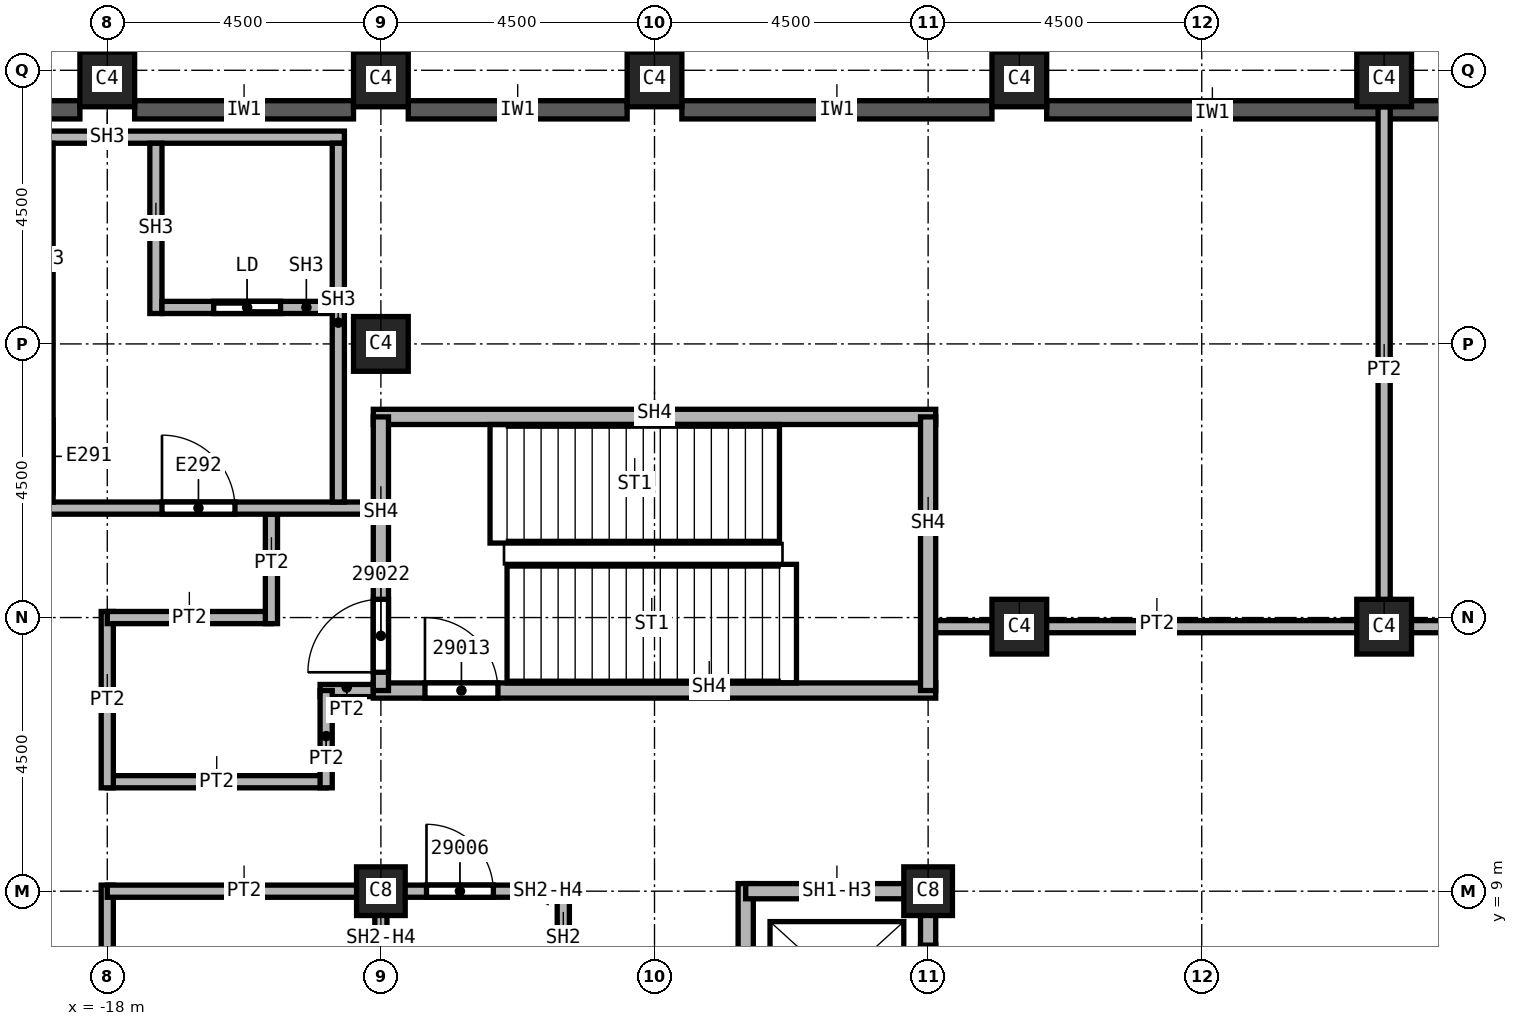
"""IFC4 building model, lengths in metres.
Left out: names, types, materials, properties, quantities, classifications, styles, units other than length and angle.
Written with IfcOpenShell. Run it as: python <this file> out.ifc"""

import sys

from ifc_helpers import new_model, si_unit, direction, frame, frame_2d, origin, origin_2d, place, context, subcontext, project, spatial, rectangle, extrude, element, fill, save


model = new_model("IFC4")
c1 = context("Model", 3, precision=1e-05, world=origin(), true_north=direction((0.0, 1.0)))
c2 = subcontext(c1, "Body", "Model", "MODEL_VIEW")
j1 = project(units=[si_unit("LENGTHUNIT", "METRE"), si_unit("PLANEANGLEUNIT", "RADIAN")], contexts=[c1])
p1 = place(None, origin())
s1 = spatial("IfcSite", under=j1, at=p1, CompositionType="ELEMENT")
p2 = place(p1, origin())
s2 = spatial("IfcBuilding", under=s1, at=p2, CompositionType="ELEMENT")
p3 = place(p2, frame((0.0, 0.0, 294.0)))
s3 = spatial("IfcBuildingStorey", under=s2, at=p3, CompositionType="ELEMENT", Elevation=294.0)
p4 = place(p3, frame((-13.5, 18.0, 0.0), z_axis=(0.0, 0.0, 1.0), x_axis=(1.0, 0.0, 0.0)))
e1 = element("IfcColumn", 1, at=p4, inside=s3, PredefinedType="COLUMN", context=c2, shape_type="SweptSolid", body=[
    extrude(rectangle(XDim=0.9, YDim=0.9, at=origin_2d()), origin(), (0.0, 0.0, 1.0), 5.74),
])
for number, where, z_axis, x_axis in (
    (2, (-4.5, 9.0, 0.0), (0.0, 0.0, 1.0), (1.0, 0.0, 0.0)),
    (3, (-13.5, 9.0, 0.0), (0.0, 0.0, 1.0), (1.0, 0.0, 0.0)),
):
    element("IfcColumn", number, at=place(p3, frame(where, z_axis=z_axis, x_axis=x_axis)), inside=s3, PredefinedType="COLUMN", context=c2, shape_type="SweptSolid", body=[
        extrude(rectangle(XDim=0.8, YDim=0.8, at=origin_2d()), origin(), (0.0, 0.0, 1.0), 5.74),
    ])
for number, where, z_axis, x_axis in (
    (4, (3.0, 22.35, 0.0), (0.0, 0.18, 0.984), (-1.0, 0.0, 0.0)),
    (5, (-3.0, 22.35, 0.0), (0.0, 0.18, 0.984), (-1.0, 0.0, 0.0)),
    (6, (-9.0, 22.35, 0.0), (0.0, 0.18, 0.984), (-1.0, 0.0, 0.0)),
    (7, (-13.5, 22.35, 0.0), (0.0, 0.18, 0.984), (-1.0, 0.0, 0.0)),
    (8, (-18.0, 22.35, 0.0), (0.0, 0.18, 0.984), (-1.0, 0.0, 0.0)),
    (9, (3.0, 13.35, 0.0), (0.0, 0.18, 0.984), (-1.0, 0.0, 0.0)),
    (10, (-3.0, 13.35, 0.0), (0.0, 0.18, 0.984), (-1.0, 0.0, 0.0)),
):
    element("IfcColumn", number, at=place(p3, frame(where, z_axis=z_axis, x_axis=x_axis)), inside=s3, PredefinedType="COLUMN", context=c2, shape_type="SweptSolid", body=[
        extrude(rectangle(XDim=0.9, YDim=0.9, at=origin_2d()), origin(), (0.0, 0.0, 1.0), 5.835),
    ])
for number, where, z_axis, x_axis in (
    (11, (8.55, 21.85, 0.0), (0.0, 0.0, 1.0), (-1.0, 0.0, 0.0)),
    (12, (2.95, 21.85, 0.0), (0.0, 0.0, 1.0), (-1.0, 0.0, 0.0)),
):
    element("IfcWall", number, at=place(p3, frame(where, z_axis=z_axis, x_axis=x_axis)), inside=s3, PredefinedType="SOLIDWALL", context=c2, shape_type="SweptSolid", body=[
        extrude(rectangle(XDim=5.5, YDim=0.3, at=frame_2d((2.75, 0.0))), origin(), (0.0, 0.0, 1.0), 5.14),
    ])
p5 = place(p3, frame((-3.45, 21.85, 0.0), z_axis=(0.0, 0.0, 1.0), x_axis=(-1.0, 0.0, 0.0)))
e13 = element("IfcWall", 13, at=p5, inside=s3, PredefinedType="SOLIDWALL", context=c2, shape_type="SweptSolid", body=[
    extrude(rectangle(XDim=5.1, YDim=0.3, at=frame_2d((2.55, 0.0))), origin(), (0.0, 0.0, 1.0), 5.14),
])
for number, where, z_axis, x_axis in (
    (14, (-9.45, 21.85, 0.0), (0.0, 0.0, 1.0), (-1.0, 0.0, 0.0)),
    (15, (-13.95, 21.85, 0.0), (0.0, 0.0, 1.0), (-1.0, 0.0, 0.0)),
):
    element("IfcWall", number, at=place(p3, frame(where, z_axis=z_axis, x_axis=x_axis)), inside=s3, PredefinedType="SOLIDWALL", context=c2, shape_type="SweptSolid", body=[
        extrude(rectangle(XDim=3.6, YDim=0.3, at=frame_2d((1.8, 0.0))), origin(), (0.0, 0.0, 1.0), 5.14),
    ])
p6 = place(p3, frame((-18.45, 21.85, 0.0), z_axis=(0.0, 0.0, 1.0), x_axis=(-1.0, 0.0, 0.0)))
e16 = element("IfcWall", 16, at=p6, inside=s3, PredefinedType="SOLIDWALL", context=c2, shape_type="SweptSolid", body=[
    extrude(rectangle(XDim=3.8, YDim=0.3, at=frame_2d((1.9, 0.0))), origin(), (0.0, 0.0, 1.0), 5.14),
])
p7 = place(p3, frame((-18.0, 9.1, 0.0), z_axis=(0.0, 0.0, 1.0), x_axis=(0.0, -1.0, 0.0)))
e17 = element("IfcWall", 17, at=p7, inside=s3, PredefinedType="PARTITIONING", context=c2, shape_type="SweptSolid", body=[
    extrude(rectangle(XDim=18.2, YDim=0.2, at=frame_2d((9.1, 0.0))), origin(), (0.0, 0.0, 1.0), 5.74),
])
p8 = place(p7, frame((16.3, 0.0, 0.0)))
e18 = element("IfcOpeningElement", 18, at=p8, cuts=e17, PredefinedType="OPENING", context=c2, shape_type="SweptSolid", body=[
    extrude(rectangle(XDim=1.0, YDim=2.1, at=frame_2d((0.5, 1.05))), frame((0.0, 0.1, 0.0), z_axis=(0.0, -1.0, 0.0), x_axis=(1.0, 0.0, 0.0)), (0.0, 0.0, 1.0), 0.2),
])
p9 = place(p7, frame((6.4, 0.0, 0.0)))
e19 = element("IfcOpeningElement", 19, at=p9, cuts=e17, PredefinedType="OPENING", context=c2, shape_type="SweptSolid", body=[
    extrude(rectangle(XDim=1.0, YDim=2.1, at=frame_2d((0.5, 1.05))), frame((0.0, 0.1, 0.0), z_axis=(0.0, -1.0, 0.0), x_axis=(1.0, 0.0, 0.0)), (0.0, 0.0, 1.0), 0.2),
])
p10 = place(p3, frame((-18.0, 10.8, 0.0), z_axis=(0.0, 0.0, 1.0), x_axis=(1.0, 0.0, 0.0)))
e20 = element("IfcWall", 20, at=p10, inside=s3, PredefinedType="PARTITIONING", context=c2, shape_type="SweptSolid", body=[
    extrude(rectangle(XDim=3.6, YDim=0.2, at=frame_2d((1.8, 0.0))), origin(), (0.0, 0.0, 1.0), 5.74),
])
p11 = place(p3, frame((-18.0, 13.6, 0.0), z_axis=(0.0, 0.0, 1.0), x_axis=(0.0, -1.0, 0.0)))
e21 = element("IfcWall", 21, at=p11, inside=s3, PredefinedType="PARTITIONING", context=c2, shape_type="SweptSolid", body=[
    extrude(rectangle(XDim=2.9, YDim=0.2, at=frame_2d((1.45, 0.0))), origin(), (0.0, 0.0, 1.0), 5.74),
])
p12 = place(p3, frame((-15.3, 13.5, 0.0), z_axis=(0.0, 0.0, 1.0), x_axis=(-1.0, 0.0, 0.0)))
e22 = element("IfcWall", 22, at=p12, inside=s3, PredefinedType="PARTITIONING", context=c2, shape_type="SweptSolid", body=[
    extrude(rectangle(XDim=2.7, YDim=0.2, at=frame_2d((1.35, 0.0))), origin(), (0.0, 0.0, 1.0), 5.74),
])
p13 = place(p3, frame((-15.3, 15.2, 0.0), z_axis=(0.0, 0.0, 1.0), x_axis=(0.0, -1.0, 0.0)))
e23 = element("IfcWall", 23, at=p13, inside=s3, PredefinedType="PARTITIONING", context=c2, shape_type="SweptSolid", body=[
    extrude(rectangle(XDim=1.8, YDim=0.2, at=frame_2d((0.9, 0.0))), origin(), (0.0, 0.0, 1.0), 5.74),
])
p14 = place(p3, frame((-14.5, 12.3, 0.0), z_axis=(0.0, 0.0, 1.0), x_axis=(1.0, 0.0, 0.0)))
e24 = element("IfcWall", 24, at=p14, inside=s3, PredefinedType="PARTITIONING", context=c2, shape_type="SweptSolid", body=[
    extrude(rectangle(XDim=1.125, YDim=0.2, at=frame_2d((0.562, 0.0))), origin(), (0.0, 0.0, 1.0), 5.74),
])
p15 = place(p3, frame((-13.5, 9.0, 0.0), z_axis=(0.0, 0.0, 1.0), x_axis=(-1.0, 0.0, 0.0)))
e25 = element("IfcWall", 25, at=p15, inside=s3, PredefinedType="PARTITIONING", context=c2, shape_type="SweptSolid", body=[
    extrude(rectangle(XDim=4.5, YDim=0.2, at=frame_2d((2.25, 0.0))), origin(), (0.0, 0.0, 1.0), 5.74),
])
p16 = place(p3, frame((-14.4, 10.7, 0.0), z_axis=(0.0, 0.0, 1.0), x_axis=(0.0, 1.0, 0.0)))
e26 = element("IfcWall", 26, at=p16, inside=s3, PredefinedType="PARTITIONING", context=c2, shape_type="SweptSolid", body=[
    extrude(rectangle(XDim=1.6, YDim=0.2, at=frame_2d((0.8, 0.0))), origin(), (0.0, 0.0, 1.0), 5.74),
])
p17 = place(p3, frame((-4.5, 13.35, 0.0), z_axis=(0.0, 0.0, 1.0), x_axis=(1.0, 0.0, 0.0)))
e27 = element("IfcWall", 27, at=p17, inside=s3, PredefinedType="PARTITIONING", context=c2, shape_type="SweptSolid", body=[
    extrude(rectangle(XDim=9.0, YDim=0.2, at=frame_2d((4.5, 0.0))), origin(), (0.0, 0.0, 1.0), 5.74),
])
p18 = place(p3, frame((3.0, 21.9, 0.0), z_axis=(0.0, 0.0, 1.0), x_axis=(0.0, -1.0, 0.0)))
e28 = element("IfcWall", 28, at=p18, inside=s3, PredefinedType="PARTITIONING", context=c2, shape_type="SweptSolid", body=[
    extrude(rectangle(XDim=8.55, YDim=0.2, at=frame_2d((4.275, 0.0))), origin(), (0.0, 0.0, 1.0), 5.74),
])
p19 = place(p3, frame((-13.6, 9.0, 0.0), z_axis=(0.0, 0.0, 1.0), x_axis=(1.0, 0.0, 0.0)))
e29 = element("IfcWall", 29, at=p19, inside=s3, PredefinedType="SOLIDWALL", context=c2, shape_type="SweptSolid", body=[
    extrude(rectangle(XDim=3.1, YDim=0.2, at=frame_2d((1.55, 0.0))), origin(), (0.0, 0.0, 1.0), 5.062),
])
p20 = place(p19, frame((0.85, 0.0, 0.0)))
e30 = element("IfcOpeningElement", 30, at=p20, cuts=e29, PredefinedType="OPENING", context=c2, shape_type="SweptSolid", body=[
    extrude(rectangle(XDim=1.1, YDim=2.1, at=frame_2d((0.55, 1.05))), frame((0.0, 0.1, 0.0), z_axis=(0.0, -1.0, 0.0), x_axis=(1.0, 0.0, 0.0)), (0.0, 0.0, 1.0), 0.2),
])
p21 = place(p3, frame((-13.5, 7.5, 0.0), z_axis=(0.0, 0.0, 1.0), x_axis=(0.0, 1.0, 0.0)))
e31 = element("IfcWall", 31, at=p21, inside=s3, PredefinedType="SOLIDWALL", context=c2, shape_type="SweptSolid", body=[
    extrude(rectangle(XDim=1.6, YDim=0.2, at=frame_2d((0.8, 0.0))), origin(), (0.0, 0.0, 1.0), 5.062),
])
p22 = place(p3, frame((-10.5, 7.425, 0.0), z_axis=(0.0, 0.0, 1.0), x_axis=(0.0, 1.0, 0.0)))
e32 = element("IfcWall", 32, at=p22, inside=s3, PredefinedType="SOLIDWALL", context=c2, shape_type="SweptSolid", body=[
    extrude(rectangle(XDim=1.675, YDim=0.2, at=frame_2d((0.837, 0.0))), origin(), (0.0, 0.0, 1.0), 5.74),
])
p23 = place(p3, frame((-7.5, -3.125, 0.0), z_axis=(0.0, 0.0, 1.0), x_axis=(0.0, 1.0, 0.0)))
e33 = element("IfcWall", 33, at=p23, inside=s3, PredefinedType="SOLIDWALL", context=c2, shape_type="SweptSolid", body=[
    extrude(rectangle(XDim=12.25, YDim=0.25, at=frame_2d((6.125, 0.0))), origin(), (0.0, 0.0, 1.0), 5.74),
])
p24 = place(p3, frame((-7.5, 9.0, 0.0), z_axis=(0.0, 0.0, 1.0), x_axis=(1.0, 0.0, 0.0)))
e34 = element("IfcWall", 34, at=p24, inside=s3, PredefinedType="SOLIDWALL", context=c2, shape_type="SweptSolid", body=[
    extrude(rectangle(XDim=3.0, YDim=0.25, at=frame_2d((1.5, 0.0))), origin(), (0.0, 0.0, 1.0), 5.062),
])
p25 = place(p3, frame((-4.5, 9.125, 0.0), z_axis=(0.0, 0.0, 1.0), x_axis=(0.0, -1.0, 0.0)))
e35 = element("IfcWall", 35, at=p25, inside=s3, PredefinedType="SOLIDWALL", context=c2, shape_type="SweptSolid", body=[
    extrude(rectangle(XDim=9.125, YDim=0.25, at=frame_2d((4.562, 0.0))), origin(), (0.0, 0.0, 1.0), 5.062),
])
p26 = place(p25, frame((7.075, 0.0, 0.0)))
e36 = element("IfcOpeningElement", 36, at=p26, cuts=e35, PredefinedType="OPENING", context=c2, shape_type="SweptSolid", body=[
    extrude(rectangle(XDim=1.1, YDim=2.1, at=frame_2d((0.55, 1.05))), frame((0.0, 0.125, 0.0), z_axis=(0.0, -1.0, 0.0), x_axis=(1.0, 0.0, 0.0)), (0.0, 0.0, 1.0), 0.25),
])
p27 = place(p25, frame((4.075, 0.0, 0.0)))
e37 = element("IfcOpeningElement", 37, at=p27, cuts=e35, PredefinedType="OPENING", context=c2, shape_type="SweptSolid", body=[
    extrude(rectangle(XDim=1.1, YDim=2.1, at=frame_2d((0.55, 1.05))), frame((0.0, 0.125, 0.0), z_axis=(0.0, -1.0, 0.0), x_axis=(1.0, 0.0, 0.0)), (0.0, 0.0, 1.0), 0.25),
])
p28 = place(p25, frame((1.012, 0.0, 0.0)))
e38 = element("IfcOpeningElement", 38, at=p28, cuts=e35, PredefinedType="OPENING", context=c2, shape_type="SweptSolid", body=[
    extrude(rectangle(XDim=1.1, YDim=2.1, at=frame_2d((0.55, 1.05))), frame((0.0, 0.125, 0.0), z_axis=(0.0, -1.0, 0.0), x_axis=(1.0, 0.0, 0.0)), (0.0, 0.0, 1.0), 0.25),
])
p29 = place(p3, frame((-13.625, 12.3, 0.0), z_axis=(0.0, 0.0, 1.0), x_axis=(1.0, 0.0, 0.0)))
e39 = element("IfcWall", 39, at=p29, inside=s3, PredefinedType="SOLIDWALL", context=c2, shape_type="SweptSolid", body=[
    extrude(rectangle(XDim=9.25, YDim=0.25, at=frame_2d((4.625, 0.0))), origin(), (0.0, 0.0, 1.0), 5.74),
])
p30 = place(p29, frame((0.85, 0.0, 0.0)))
e40 = element("IfcOpeningElement", 40, at=p30, cuts=e39, PredefinedType="OPENING", context=c2, shape_type="SweptSolid", body=[
    extrude(rectangle(XDim=1.2, YDim=2.1, at=frame_2d((0.6, 1.05))), frame((0.0, 0.125, 0.0), z_axis=(0.0, -1.0, 0.0), x_axis=(1.0, 0.0, 0.0)), (0.0, 0.0, 1.0), 0.25),
])
p31 = place(p3, frame((-13.625, 16.8, 0.0), z_axis=(0.0, 0.0, 1.0), x_axis=(1.0, 0.0, 0.0)))
e41 = element("IfcWall", 41, at=p31, inside=s3, PredefinedType="SOLIDWALL", context=c2, shape_type="SweptSolid", body=[
    extrude(rectangle(XDim=9.25, YDim=0.25, at=frame_2d((4.625, 0.0))), origin(), (0.0, 0.0, 1.0), 5.74),
])
p32 = place(p3, frame((-13.5, 12.3, 0.0), z_axis=(0.0, 0.0, 1.0), x_axis=(0.0, 1.0, 0.0)))
e42 = element("IfcWall", 42, at=p32, inside=s3, PredefinedType="SOLIDWALL", context=c2, shape_type="SweptSolid", body=[
    extrude(rectangle(XDim=4.5, YDim=0.25, at=frame_2d((2.25, 0.0))), origin(), (0.0, 0.0, 1.0), 5.74),
])
p33 = place(p32, frame((0.3, 0.0, 0.0)))
e43 = element("IfcOpeningElement", 43, at=p33, cuts=e42, PredefinedType="OPENING", context=c2, shape_type="SweptSolid", body=[
    extrude(rectangle(XDim=1.2, YDim=2.1, at=frame_2d((0.6, 1.05))), frame((0.0, 0.125, 0.0), z_axis=(0.0, -1.0, 0.0), x_axis=(1.0, 0.0, 0.0)), (0.0, 0.0, 1.0), 0.25),
])
p34 = place(p3, frame((-4.5, 16.8, 0.0), z_axis=(0.0, 0.0, 1.0), x_axis=(0.0, -1.0, 0.0)))
e44 = element("IfcWall", 44, at=p34, inside=s3, PredefinedType="SOLIDWALL", context=c2, shape_type="SweptSolid", body=[
    extrude(rectangle(XDim=4.5, YDim=0.25, at=frame_2d((2.25, 0.0))), origin(), (0.0, 0.0, 1.0), 5.74),
])
p35 = place(p3, frame((-21.9, 15.3, 0.0), z_axis=(0.0, 0.0, 1.0), x_axis=(1.0, 0.0, 0.0)))
e45 = element("IfcWall", 45, at=p35, inside=s3, PredefinedType="SOLIDWALL", context=c2, shape_type="SweptSolid", body=[
    extrude(rectangle(XDim=8.275, YDim=0.2, at=frame_2d((4.137, 0.0))), origin(), (0.0, 0.0, 1.0), 5.74),
])
p36 = place(p35, frame((4.8, 0.0, 0.0)))
e46 = element("IfcOpeningElement", 46, at=p36, cuts=e45, PredefinedType="OPENING", context=c2, shape_type="SweptSolid", body=[
    extrude(rectangle(XDim=1.2, YDim=2.1, at=frame_2d((0.6, 1.05))), frame((0.0, 0.1, 0.0), z_axis=(0.0, -1.0, 0.0), x_axis=(1.0, 0.0, 0.0)), (0.0, 0.0, 1.0), 0.2),
])
p37 = place(p3, frame((-21.9, 21.4, 0.0), z_axis=(0.0, 0.0, 1.0), x_axis=(1.0, 0.0, 0.0)))
e47 = element("IfcWall", 47, at=p37, inside=s3, PredefinedType="SOLIDWALL", context=c2, shape_type="SweptSolid", body=[
    extrude(rectangle(XDim=7.8, YDim=0.2, at=frame_2d((3.9, 0.0))), origin(), (0.0, 0.0, 1.0), 5.74),
])
p38 = place(p3, frame((-14.2, 15.4, 0.0), z_axis=(0.0, 0.0, 1.0), x_axis=(0.0, 1.0, 0.0)))
e48 = element("IfcWall", 48, at=p38, inside=s3, PredefinedType="SOLIDWALL", context=c2, shape_type="SweptSolid", body=[
    extrude(rectangle(XDim=5.9, YDim=0.2, at=frame_2d((2.95, 0.0))), origin(), (0.0, 0.0, 1.0), 5.74),
])
p39 = place(p3, frame((-18.99, 15.4, 0.0), z_axis=(0.0, 0.0, 1.0), x_axis=(0.0, 1.0, 0.0)))
e49 = element("IfcWall", 49, at=p39, inside=s3, PredefinedType="SOLIDWALL", context=c2, shape_type="SweptSolid", body=[
    extrude(rectangle(XDim=5.9, YDim=0.2, at=frame_2d((2.95, 0.0))), origin(), (0.0, 0.0, 1.0), 5.74),
])
p40 = place(p39, frame((0.15, 0.0, 0.0)))
e50 = element("IfcOpeningElement", 50, at=p40, cuts=e49, PredefinedType="OPENING", context=c2, shape_type="SweptSolid", body=[
    extrude(rectangle(XDim=1.2, YDim=2.1, at=frame_2d((0.6, 1.05))), frame((0.0, 0.1, 0.0), z_axis=(0.0, -1.0, 0.0), x_axis=(1.0, 0.0, 0.0)), (0.0, 0.0, 1.0), 0.2),
])
p41 = place(p3, frame((-17.2, 18.5, 0.0), z_axis=(0.0, 0.0, 1.0), x_axis=(0.0, 1.0, 0.0)))
e51 = element("IfcWall", 51, at=p41, inside=s3, PredefinedType="SOLIDWALL", context=c2, shape_type="SweptSolid", body=[
    extrude(rectangle(XDim=2.8, YDim=0.2, at=frame_2d((1.4, 0.0))), origin(), (0.0, 0.0, 1.0), 5.74),
])
p42 = place(p3, frame((-17.1, 18.6, 0.0), z_axis=(0.0, 0.0, 1.0), x_axis=(1.0, 0.0, 0.0)))
e52 = element("IfcWall", 52, at=p42, inside=s3, PredefinedType="SOLIDWALL", context=c2, shape_type="SweptSolid", body=[
    extrude(rectangle(XDim=2.8, YDim=0.2, at=frame_2d((1.4, 0.0))), origin(), (0.0, 0.0, 1.0), 5.74),
])
p43 = place(p42, frame((0.85, 0.0, 0.0)))
e53 = element("IfcOpeningElement", 53, at=p43, cuts=e52, PredefinedType="OPENING", context=c2, shape_type="SweptSolid", body=[
    extrude(rectangle(XDim=1.1, YDim=2.1, at=frame_2d((0.55, 1.05))), frame((0.0, 0.1, 0.0), z_axis=(0.0, -1.0, 0.0), x_axis=(1.0, 0.0, 0.0)), (0.0, 0.0, 1.0), 0.2),
])
p44 = place(p20, origin())
e54 = element("IfcDoor", 54, at=p44, inside=s3, OperationType="SINGLE_SWING_LEFT", PredefinedType="DOOR", context=c2, shape_type="SweptSolid", body=[
    extrude(rectangle(XDim=1.1, YDim=2.1, at=frame_2d((0.55, 1.05))), frame((0.0, 0.025, 0.0), z_axis=(0.0, -1.0, 0.0), x_axis=(1.0, 0.0, 0.0)), (0.0, 0.0, 1.0), 0.05),
])
fill(e30, e54)
p45 = place(p30, origin())
e55 = element("IfcDoor", 55, at=p45, inside=s3, OperationType="SINGLE_SWING_RIGHT", PredefinedType="DOOR", context=c2, shape_type="SweptSolid", body=[
    extrude(rectangle(XDim=1.2, YDim=2.1, at=frame_2d((0.6, 1.05))), frame((0.0, 0.025, 0.0), z_axis=(0.0, -1.0, 0.0), x_axis=(1.0, 0.0, 0.0)), (0.0, 0.0, 1.0), 0.05),
])
fill(e40, e55)
p46 = place(p33, origin())
e56 = element("IfcDoor", 56, at=p46, inside=s3, OperationType="SINGLE_SWING_LEFT", PredefinedType="DOOR", context=c2, shape_type="SweptSolid", body=[
    extrude(rectangle(XDim=1.2, YDim=2.1, at=frame_2d((0.6, 1.05))), frame((0.0, 0.025, 0.0), z_axis=(0.0, -1.0, 0.0), x_axis=(1.0, 0.0, 0.0)), (0.0, 0.0, 1.0), 0.05),
])
fill(e43, e56)
p47 = place(p28, origin())
e57 = element("IfcDoor", 57, at=p47, inside=s3, OperationType="SLIDING_TO_LEFT", PredefinedType="DOOR", context=c2, shape_type="SweptSolid", body=[
    extrude(rectangle(XDim=1.1, YDim=2.1, at=frame_2d((0.55, 1.05))), frame((0.0, 0.025, 0.0), z_axis=(0.0, -1.0, 0.0), x_axis=(1.0, 0.0, 0.0)), (0.0, 0.0, 1.0), 0.05),
])
fill(e38, e57)
p48 = place(p43, origin())
e58 = element("IfcDoor", 58, at=p48, inside=s3, OperationType="SLIDING_TO_LEFT", PredefinedType="DOOR", context=c2, shape_type="SweptSolid", body=[
    extrude(rectangle(XDim=1.1, YDim=2.1, at=frame_2d((0.55, 1.05))), frame((0.0, 0.025, 0.0), z_axis=(0.0, -1.0, 0.0), x_axis=(1.0, 0.0, 0.0)), (0.0, 0.0, 1.0), 0.05),
])
fill(e53, e58)
p49 = place(p36, origin())
e59 = element("IfcDoor", 59, at=p49, inside=s3, OperationType="SINGLE_SWING_RIGHT", PredefinedType="DOOR", context=c2, shape_type="SweptSolid", body=[
    extrude(rectangle(XDim=1.2, YDim=2.1, at=frame_2d((0.6, 1.05))), frame((0.0, 0.025, 0.0), z_axis=(0.0, -1.0, 0.0), x_axis=(1.0, 0.0, 0.0)), (0.0, 0.0, 1.0), 0.05),
])
fill(e46, e59)
save(model, sys.argv[1])
